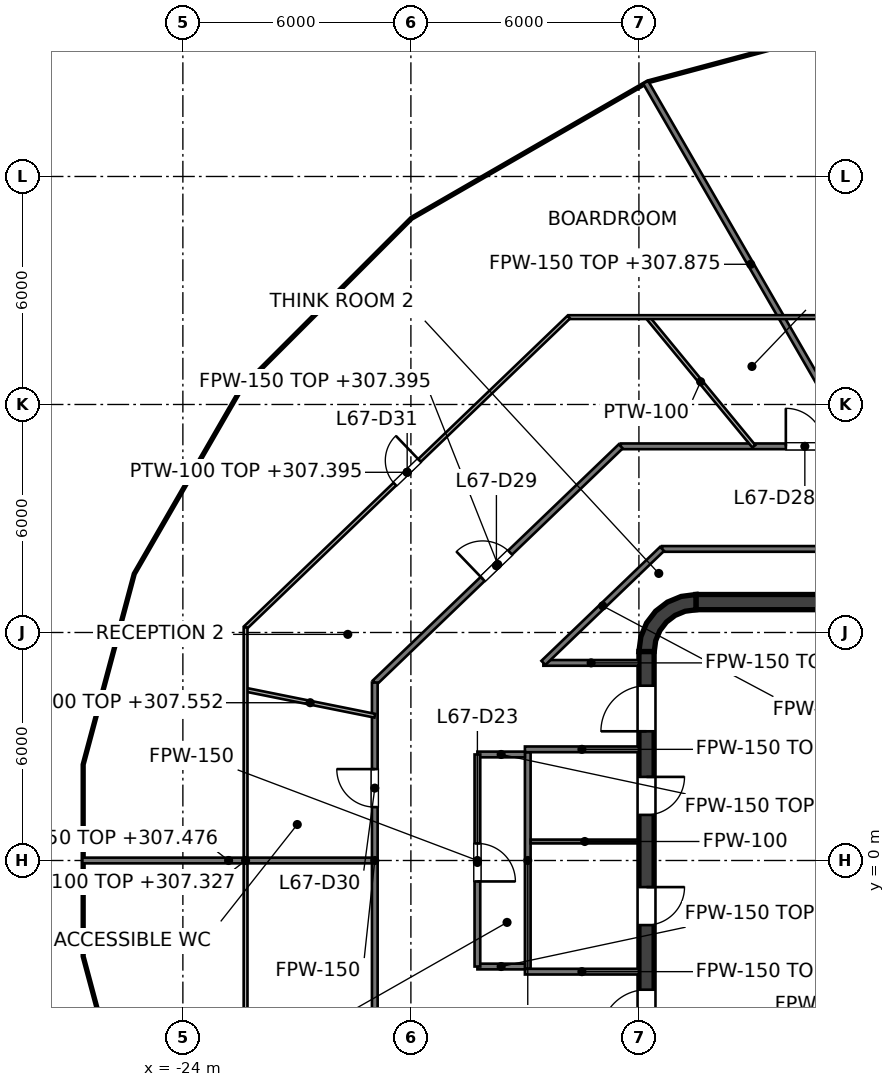
"""IFC4 building model, lengths in metres.
Left out: names, types, materials, properties, quantities, classifications, styles, units other than length and angle.
Written with IfcOpenShell. Run it as: python <this file> out.ifc"""

import sys

from ifc_helpers import new_model, si_unit, direction, frame, frame_2d, origin, place, context, subcontext, project, spatial, polyline, rectangle, outline, extrude, element, fill, save


model = new_model("IFC4")
c1 = context("Model", 3, precision=1e-05, world=origin(), true_north=direction((0.0, 1.0)))
c2 = subcontext(c1, "Body", "Model", "MODEL_VIEW")
j1 = project(units=[si_unit("LENGTHUNIT", "METRE"), si_unit("PLANEANGLEUNIT", "RADIAN")], contexts=[c1])
p1 = place(None, origin())
s1 = spatial("IfcSite", under=j1, at=p1, CompositionType="ELEMENT")
p2 = place(p1, origin())
s2 = spatial("IfcBuilding", under=s1, at=p2, CompositionType="ELEMENT")
p3 = place(p2, frame((0.0, 0.0, 304.4)))
s3 = spatial("IfcBuildingStorey", under=s2, at=p3, CompositionType="ELEMENT", Elevation=304.4)
p4 = place(p3, frame((-10.5, 6.8, 0.0), z_axis=(0.0, 0.0, 1.0), x_axis=(1.0, 0.0, 0.0)))
e1 = element("IfcWall", 1, at=p4, inside=s3, PredefinedType="SHEAR", context=c2, shape_type="SweptSolid", body=[
    extrude(rectangle(XDim=21.0, YDim=0.4, at=frame_2d((10.5, 0.0))), origin(), (0.0, 0.0, 1.0), 4.0),
])
p5 = place(p3, frame((-11.8, -5.5, 0.0), z_axis=(0.0, 0.0, 1.0), x_axis=(0.0, 1.0, 0.0)))
e2 = element("IfcWall", 2, at=p5, inside=s3, PredefinedType="SHEAR", context=c2, shape_type="SweptSolid", body=[
    extrude(rectangle(XDim=11.0, YDim=0.4, at=frame_2d((5.5, 0.0))), origin(), (0.0, 0.0, 1.0), 4.0),
])
p6 = place(p5, frame((3.8, 0.0, 0.0)))
e3 = element("IfcOpeningElement", 3, at=p6, cuts=e2, PredefinedType="OPENING", context=c2, shape_type="SweptSolid", body=[
    extrude(rectangle(XDim=1.0, YDim=2.1, at=frame_2d((0.5, 1.05))), frame((0.0, 0.2, 0.0), z_axis=(0.0, -1.0, 0.0), x_axis=(1.0, 0.0, 0.0)), (0.0, 0.0, 1.0), 0.4),
])
p7 = place(p5, frame((6.7, 0.0, 0.0)))
e4 = element("IfcOpeningElement", 4, at=p7, cuts=e2, PredefinedType="OPENING", context=c2, shape_type="SweptSolid", body=[
    extrude(rectangle(XDim=1.0, YDim=2.1, at=frame_2d((0.5, 1.05))), frame((0.0, 0.2, 0.0), z_axis=(0.0, -1.0, 0.0), x_axis=(1.0, 0.0, 0.0)), (0.0, 0.0, 1.0), 0.4),
])
p8 = place(p5, frame((0.9, 0.0, 0.0)))
e5 = element("IfcOpeningElement", 5, at=p8, cuts=e2, PredefinedType="OPENING", context=c2, shape_type="SweptSolid", body=[
    extrude(rectangle(XDim=1.2, YDim=2.1, at=frame_2d((0.6, 1.05))), frame((0.0, 0.2, 0.0), z_axis=(0.0, -1.0, 0.0), x_axis=(1.0, 0.0, 0.0)), (0.0, 0.0, 1.0), 0.4),
])
p9 = place(p5, frame((8.9, 0.0, 0.0)))
e6 = element("IfcOpeningElement", 6, at=p9, cuts=e2, PredefinedType="OPENING", context=c2, shape_type="SweptSolid", body=[
    extrude(rectangle(XDim=1.2, YDim=2.1, at=frame_2d((0.6, 1.05))), frame((0.0, 0.2, 0.0), z_axis=(0.0, -1.0, 0.0), x_axis=(1.0, 0.0, 0.0)), (0.0, 0.0, 1.0), 0.4),
])
p10 = place(p3, origin())
e7 = element("IfcWall", 7, at=p10, inside=s3, PredefinedType="SHEAR", context=c2, shape_type="SweptSolid", body=[
    extrude(outline(polyline([(-12.0, 5.5), (-11.596, 5.5), (-11.559, 5.784), (-11.45, 6.048), (-11.275, 6.275), (-11.048, 6.45), (-10.784, 6.559), (-10.5, 6.596), (-10.5, 7.0), (-10.888, 6.949), (-11.25, 6.799), (-11.561, 6.561), (-11.799, 6.25), (-11.949, 5.888), (-12.0, 5.5)])), origin(), (0.0, 0.0, 1.0), 4.0),
])
p11 = place(p3, frame((-9.0, 4.1, 0.0), z_axis=(0.0, 0.0, 1.0), x_axis=(0.0, 1.0, 0.0)))
e8 = element("IfcWall", 8, at=p11, inside=s3, PredefinedType="SOLIDWALL", context=c2, shape_type="SweptSolid", body=[
    extrude(rectangle(XDim=2.5, YDim=0.25, at=frame_2d((1.25, 0.0))), origin(), (0.0, 0.0, 1.0), 3.85),
])
p12 = place(p11, frame((0.65, 0.0, 0.0)))
e9 = element("IfcOpeningElement", 9, at=p12, cuts=e8, PredefinedType="OPENING", context=c2, shape_type="SweptSolid", body=[
    extrude(rectangle(XDim=1.2, YDim=2.1, at=frame_2d((0.6, 1.05))), frame((0.0, 0.125, 0.0), z_axis=(0.0, -1.0, 0.0), x_axis=(1.0, 0.0, 0.0)), (0.0, 0.0, 1.0), 0.25),
])
p13 = place(p3, frame((-9.125, 1.525, 0.0), z_axis=(0.0, 0.0, 1.0), x_axis=(1.0, 0.0, 0.0)))
e10 = element("IfcWall", 10, at=p13, inside=s3, PredefinedType="SOLIDWALL", context=c2, shape_type="SweptSolid", body=[
    extrude(rectangle(XDim=8.35, YDim=0.25, at=frame_2d((4.175, 0.0))), origin(), (0.0, 0.0, 1.0), 3.85),
])
p14 = place(p13, frame((0.925, 0.0, 0.0)))
e11 = element("IfcOpeningElement", 11, at=p14, cuts=e10, PredefinedType="OPENING", context=c2, shape_type="SweptSolid", body=[
    extrude(rectangle(XDim=1.1, YDim=2.1, at=frame_2d((0.55, 1.05))), frame((0.0, 0.125, 0.0), z_axis=(0.0, -1.0, 0.0), x_axis=(1.0, 0.0, 0.0)), (0.0, 0.0, 1.0), 0.25),
])
p15 = place(p13, frame((3.625, 0.0, 0.0)))
e12 = element("IfcOpeningElement", 12, at=p15, cuts=e10, PredefinedType="OPENING", context=c2, shape_type="SweptSolid", body=[
    extrude(rectangle(XDim=1.1, YDim=2.1, at=frame_2d((0.55, 1.05))), frame((0.0, 0.125, 0.0), z_axis=(0.0, -1.0, 0.0), x_axis=(1.0, 0.0, 0.0)), (0.0, 0.0, 1.0), 0.25),
])
p16 = place(p13, frame((6.325, 0.0, 0.0)))
e13 = element("IfcOpeningElement", 13, at=p16, cuts=e10, PredefinedType="OPENING", context=c2, shape_type="SweptSolid", body=[
    extrude(rectangle(XDim=1.1, YDim=2.1, at=frame_2d((0.55, 1.05))), frame((0.0, 0.125, 0.0), z_axis=(0.0, -1.0, 0.0), x_axis=(1.0, 0.0, 0.0)), (0.0, 0.0, 1.0), 0.25),
])
p17 = place(p3, frame((-9.125, 3.975, 0.0), z_axis=(0.0, 0.0, 1.0), x_axis=(1.0, 0.0, 0.0)))
e14 = element("IfcWall", 14, at=p17, inside=s3, PredefinedType="SOLIDWALL", context=c2, shape_type="SweptSolid", body=[
    extrude(rectangle(XDim=8.35, YDim=0.25, at=frame_2d((4.175, 0.0))), origin(), (0.0, 0.0, 1.0), 3.85),
])
p18 = place(p3, frame((-9.0, 1.65, 0.0), z_axis=(0.0, 0.0, 1.0), x_axis=(0.0, 1.0, 0.0)))
e15 = element("IfcWall", 15, at=p18, inside=s3, PredefinedType="SOLIDWALL", context=c2, shape_type="SweptSolid", body=[
    extrude(rectangle(XDim=2.2, YDim=0.25, at=frame_2d((1.1, 0.0))), origin(), (0.0, 0.0, 1.0), 3.85),
])
p19 = place(p3, frame((-9.125, -1.525, 0.0), z_axis=(0.0, 0.0, 1.0), x_axis=(1.0, 0.0, 0.0)))
e16 = element("IfcWall", 16, at=p19, inside=s3, PredefinedType="SOLIDWALL", context=c2, shape_type="SweptSolid", body=[
    extrude(rectangle(XDim=18.25, YDim=0.25, at=frame_2d((9.125, 0.0))), origin(), (0.0, 0.0, 1.0), 3.85),
])
p20 = place(p19, frame((7.15, 0.0, 0.0)))
e17 = element("IfcOpeningElement", 17, at=p20, cuts=e16, PredefinedType="OPENING", context=c2, shape_type="SweptSolid", body=[
    extrude(rectangle(XDim=1.2, YDim=2.1, at=frame_2d((0.6, 1.05))), frame((0.0, 0.125, 0.0), z_axis=(0.0, -1.0, 0.0), x_axis=(1.0, 0.0, 0.0)), (0.0, 0.0, 1.0), 0.25),
])
p21 = place(p19, frame((10.2, 0.0, 0.0)))
e18 = element("IfcOpeningElement", 18, at=p21, cuts=e16, PredefinedType="OPENING", context=c2, shape_type="SweptSolid", body=[
    extrude(rectangle(XDim=1.2, YDim=2.1, at=frame_2d((0.6, 1.05))), frame((0.0, 0.125, 0.0), z_axis=(0.0, -1.0, 0.0), x_axis=(1.0, 0.0, 0.0)), (0.0, 0.0, 1.0), 0.25),
])
p22 = place(p19, frame((16.075, 0.0, 0.0)))
e19 = element("IfcOpeningElement", 19, at=p22, cuts=e16, PredefinedType="OPENING", context=c2, shape_type="SweptSolid", body=[
    extrude(rectangle(XDim=1.0, YDim=2.1, at=frame_2d((0.5, 1.05))), frame((0.0, 0.125, 0.0), z_axis=(0.0, -1.0, 0.0), x_axis=(1.0, 0.0, 0.0)), (0.0, 0.0, 1.0), 0.25),
])
p23 = place(p3, frame((-9.0, -3.85, 0.0), z_axis=(0.0, 0.0, 1.0), x_axis=(0.0, 1.0, 0.0)))
e20 = element("IfcWall", 20, at=p23, inside=s3, PredefinedType="SOLIDWALL", context=c2, shape_type="SweptSolid", body=[
    extrude(rectangle(XDim=2.2, YDim=0.25, at=frame_2d((1.1, 0.0))), origin(), (0.0, 0.0, 1.0), 3.85),
])
p24 = place(p3, frame((-14.925, -2.85, 0.0), z_axis=(0.0, 0.0, 1.0), x_axis=(0.0, 1.0, 0.0)))
e21 = element("IfcWall", 21, at=p24, inside=s3, PredefinedType="PARTITIONING", context=c2, shape_type="SweptSolid", body=[
    extrude(rectangle(XDim=5.7, YDim=0.15, at=frame_2d((2.85, 0.0))), origin(), (0.0, 0.0, 1.0), 2.927),
])
for number, where, z_axis, x_axis in (
    (22, (-15.0, 2.925, 0.0), (0.0, 0.0, 1.0), (1.0, 0.0, 0.0)),
    (23, (-15.0, -2.925, 0.0), (0.0, 0.0, 1.0), (1.0, 0.0, 0.0)),
):
    element("IfcWall", number, at=place(p3, frame(where, z_axis=z_axis, x_axis=x_axis)), inside=s3, PredefinedType="PARTITIONING", context=c2, shape_type="SweptSolid", body=[
        extrude(rectangle(XDim=3.0, YDim=0.15, at=frame_2d((1.5, 0.0))), origin(), (0.0, 0.0, 1.0), 3.152),
    ])
p25 = place(p3, frame((-14.85, 0.5, 0.0), z_axis=(0.0, 0.0, 1.0), x_axis=(1.0, 0.0, 0.0)))
e24 = element("IfcWall", 24, at=p25, inside=s3, PredefinedType="PARTITIONING", context=c2, shape_type="SweptSolid", body=[
    extrude(rectangle(XDim=2.85, YDim=0.1, at=frame_2d((1.425, 0.0))), origin(), (0.0, 0.0, 1.0), 3.85),
])
p26 = place(p3, frame((-11.824, 20.48, 0.0), z_axis=(0.0, 0.0, 1.0), x_axis=(0.500024263458, -0.866011394817, 0.0)))
e25 = element("IfcWall", 25, at=p26, inside=s3, PredefinedType="PARTITIONING", context=c2, shape_type="SweptSolid", body=[
    extrude(rectangle(XDim=11.063, YDim=0.15, at=frame_2d((5.532, 0.0))), origin(), (0.0, 0.0, 1.0), 3.475),
])
p27 = place(p3, frame((-16.25, -2.79, 0.0), z_axis=(0.0, 0.0, 1.0), x_axis=(1.0, 0.0, 0.0)))
e26 = element("IfcWall", 26, at=p27, inside=s3, PredefinedType="PARTITIONING", context=c2, shape_type="SweptSolid", body=[
    extrude(rectangle(XDim=1.25, YDim=0.15, at=frame_2d((0.625, 0.0))), origin(), (0.0, 0.0, 1.0), 3.85),
])
p28 = place(p3, frame((-26.644, 0.0, 0.0), z_axis=(0.0, 0.0, 1.0), x_axis=(1.0, 0.0, 0.0)))
e27 = element("IfcWall", 27, at=p28, inside=s3, PredefinedType="PARTITIONING", context=c2, shape_type="SweptSolid", body=[
    extrude(rectangle(XDim=7.694, YDim=0.15, at=frame_2d((3.847, 0.0))), origin(), (0.0, 0.0, 1.0), 3.076),
])
p29 = place(p3, frame((-16.25, 2.79, 0.0), z_axis=(0.0, 0.0, 1.0), x_axis=(1.0, 0.0, 0.0)))
e28 = element("IfcWall", 28, at=p29, inside=s3, PredefinedType="PARTITIONING", context=c2, shape_type="SweptSolid", body=[
    extrude(rectangle(XDim=1.25, YDim=0.15, at=frame_2d((0.625, 0.0))), origin(), (0.0, 0.0, 1.0), 3.85),
])
p30 = place(p3, frame((-14.514, 5.2, 0.0), z_axis=(0.0, 0.0, 1.0), x_axis=(1.0, 0.0, 0.0)))
e29 = element("IfcWall", 29, at=p30, inside=s3, PredefinedType="PARTITIONING", context=c2, shape_type="SweptSolid", body=[
    extrude(rectangle(XDim=2.514, YDim=0.15, at=frame_2d((1.257, 0.0))), origin(), (0.0, 0.0, 1.0), 3.152),
])
p31 = place(p3, frame((-11.391, 8.199, 0.0), z_axis=(0.0, 0.0, 1.0), x_axis=(1.0, 0.0, 0.0)))
e30 = element("IfcWall", 30, at=p31, inside=s3, PredefinedType="PARTITIONING", context=c2, shape_type="SweptSolid", body=[
    extrude(rectangle(XDim=22.782, YDim=0.15, at=frame_2d((11.391, 0.0))), origin(), (0.0, 0.0, 1.0), 2.927),
])
p32 = place(p31, frame((16.536, 0.0, 0.0)))
e31 = element("IfcOpeningElement", 31, at=p32, cuts=e30, PredefinedType="OPENING", context=c2, shape_type="SweptSolid", body=[
    extrude(rectangle(XDim=1.0, YDim=2.1, at=frame_2d((0.5, 1.05))), frame((0.0, 0.075, 0.0), z_axis=(0.0, -1.0, 0.0), x_axis=(1.0, 0.0, 0.0)), (0.0, 0.0, 1.0), 0.15),
])
p33 = place(p31, frame((5.145, 0.0, 0.0)))
e32 = element("IfcOpeningElement", 32, at=p33, cuts=e30, PredefinedType="OPENING", context=c2, shape_type="SweptSolid", body=[
    extrude(rectangle(XDim=1.0, YDim=2.1, at=frame_2d((0.5, 1.05))), frame((0.0, 0.075, 0.0), z_axis=(0.0, -1.0, 0.0), x_axis=(1.0, 0.0, 0.0)), (0.0, 0.0, 1.0), 0.15),
])
p34 = place(p3, frame((-12.478, 10.899, 0.0), z_axis=(0.0, 0.0, 1.0), x_axis=(1.0, 0.0, 0.0)))
e33 = element("IfcWall", 33, at=p34, inside=s3, PredefinedType="PARTITIONING", context=c2, shape_type="SweptSolid", body=[
    extrude(rectangle(XDim=24.956, YDim=0.15, at=frame_2d((12.478, 0.0))), origin(), (0.0, 0.0, 1.0), 2.927),
])
p35 = place(p34, frame((19.856, 0.0, 0.0)))
e34 = element("IfcOpeningElement", 34, at=p35, cuts=e33, PredefinedType="OPENING", context=c2, shape_type="SweptSolid", body=[
    extrude(rectangle(XDim=1.0, YDim=2.1, at=frame_2d((0.5, 1.05))), frame((0.0, 0.075, 0.0), z_axis=(0.0, -1.0, 0.0), x_axis=(1.0, 0.0, 0.0)), (0.0, 0.0, 1.0), 0.15),
])
p36 = place(p34, frame((14.508, 0.0, 0.0)))
e35 = element("IfcOpeningElement", 35, at=p36, cuts=e33, PredefinedType="OPENING", context=c2, shape_type="SweptSolid", body=[
    extrude(rectangle(XDim=1.0, YDim=2.1, at=frame_2d((0.5, 1.05))), frame((0.0, 0.075, 0.0), z_axis=(0.0, -1.0, 0.0), x_axis=(1.0, 0.0, 0.0)), (0.0, 0.0, 1.0), 0.15),
])
p37 = place(p34, frame((9.086, 0.0, 0.0)))
e36 = element("IfcOpeningElement", 36, at=p37, cuts=e33, PredefinedType="OPENING", context=c2, shape_type="SweptSolid", body=[
    extrude(rectangle(XDim=1.0, YDim=2.1, at=frame_2d((0.5, 1.05))), frame((0.0, 0.075, 0.0), z_axis=(0.0, -1.0, 0.0), x_axis=(1.0, 0.0, 0.0)), (0.0, 0.0, 1.0), 0.15),
])
p38 = place(p34, frame((4.344, 0.0, 0.0)))
e37 = element("IfcOpeningElement", 37, at=p38, cuts=e33, PredefinedType="OPENING", context=c2, shape_type="SweptSolid", body=[
    extrude(rectangle(XDim=1.0, YDim=2.1, at=frame_2d((0.5, 1.05))), frame((0.0, 0.075, 0.0), z_axis=(0.0, -1.0, 0.0), x_axis=(1.0, 0.0, 0.0)), (0.0, 0.0, 1.0), 0.15),
])
p39 = place(p3, frame((-14.514, 5.2, 0.0), z_axis=(0.0, 0.0, 1.0), x_axis=(0.721228427004, 0.692697304803, 0.0)))
e38 = element("IfcWall", 38, at=p39, inside=s3, PredefinedType="PARTITIONING", context=c2, shape_type="SweptSolid", body=[
    extrude(rectangle(XDim=4.33, YDim=0.15, at=frame_2d((2.165, 0.0))), origin(), (0.0, 0.0, 1.0), 3.076),
])
p40 = place(p3, frame((-18.95, 4.683, 0.0), z_axis=(0.0, 0.0, 1.0), x_axis=(0.721259541977, 0.692664906797, 0.0)))
e39 = element("IfcWall", 39, at=p40, inside=s3, PredefinedType="PARTITIONING", context=c2, shape_type="SweptSolid", body=[
    extrude(rectangle(XDim=8.973, YDim=0.15, at=frame_2d((4.487, 0.0))), origin(), (0.0, 0.0, 1.0), 2.995),
])
p41 = place(p40, frame((3.937, 0.0, 0.0)))
e40 = element("IfcOpeningElement", 40, at=p41, cuts=e39, PredefinedType="OPENING", context=c2, shape_type="SweptSolid", body=[
    extrude(rectangle(XDim=1.0, YDim=2.1, at=frame_2d((0.5, 1.05))), frame((0.0, 0.075, 0.0), z_axis=(0.0, -1.0, 0.0), x_axis=(1.0, 0.0, 0.0)), (0.0, 0.0, 1.0), 0.15),
])
p42 = place(p3, frame((-16.25, -2.79, 0.0), z_axis=(0.0, 0.0, 1.0), x_axis=(0.0, 1.0, 0.0)))
e41 = element("IfcWall", 41, at=p42, inside=s3, PredefinedType="PARTITIONING", context=c2, shape_type="SweptSolid", body=[
    extrude(rectangle(XDim=5.58, YDim=0.15, at=frame_2d((2.79, 0.0))), origin(), (0.0, 0.0, 1.0), 2.927),
])
p43 = place(p42, frame((2.239, 0.0, 0.0)))
e42 = element("IfcOpeningElement", 42, at=p43, cuts=e41, PredefinedType="OPENING", context=c2, shape_type="SweptSolid", body=[
    extrude(rectangle(XDim=1.0, YDim=2.1, at=frame_2d((0.5, 1.05))), frame((0.0, 0.075, 0.0), z_axis=(0.0, -1.0, 0.0), x_axis=(1.0, 0.0, 0.0)), (0.0, 0.0, 1.0), 0.15),
])
p44 = place(p3, frame((-18.95, -4.683, 0.0), z_axis=(0.0, 0.0, 1.0), x_axis=(0.0, 1.0, 0.0)))
e43 = element("IfcWall", 43, at=p44, inside=s3, PredefinedType="PARTITIONING", context=c2, shape_type="SweptSolid", body=[
    extrude(rectangle(XDim=9.366, YDim=0.15, at=frame_2d((4.683, 0.0))), origin(), (0.0, 0.0, 1.0), 2.927),
])
p45 = place(p44, frame((6.088, 0.0, 0.0)))
e44 = element("IfcOpeningElement", 44, at=p45, cuts=e43, PredefinedType="OPENING", context=c2, shape_type="SweptSolid", body=[
    extrude(rectangle(XDim=1.0, YDim=2.1, at=frame_2d((0.5, 1.05))), frame((0.0, 0.075, 0.0), z_axis=(0.0, -1.0, 0.0), x_axis=(1.0, 0.0, 0.0)), (0.0, 0.0, 1.0), 0.15),
])
p46 = place(p3, frame((-11.776, 14.299, 0.0), z_axis=(0.0, 0.0, 1.0), x_axis=(0.63566450838, -0.771965434968, 0.0)))
e45 = element("IfcWall", 45, at=p46, inside=s3, PredefinedType="PARTITIONING", context=c2, shape_type="SweptSolid", body=[
    extrude(rectangle(XDim=4.405, YDim=0.1, at=frame_2d((2.202, 0.0))), origin(), (0.0, 0.0, 1.0), 3.85),
])
p47 = place(p3, frame((-22.35, 4.494, 0.0), z_axis=(0.0, 0.0, 1.0), x_axis=(0.980368926978, -0.197171922486, 0.0)))
e46 = element("IfcWall", 46, at=p47, inside=s3, PredefinedType="PARTITIONING", context=c2, shape_type="SweptSolid", body=[
    extrude(rectangle(XDim=3.468, YDim=0.1, at=frame_2d((1.734, 0.0))), origin(), (0.0, 0.0, 1.0), 3.152),
])
p48 = place(p3, frame((-13.846, 14.299, 0.0), z_axis=(0.0, 0.0, 1.0), x_axis=(1.0, 0.0, 0.0)))
e47 = element("IfcWall", 47, at=p48, inside=s3, PredefinedType="PARTITIONING", context=c2, shape_type="SweptSolid", body=[
    extrude(rectangle(XDim=27.692, YDim=0.1, at=frame_2d((13.846, 0.0))), origin(), (0.0, 0.0, 1.0), 2.927),
])
p49 = place(p48, frame((9.035, 0.0, 0.0)))
e48 = element("IfcOpeningElement", 48, at=p49, cuts=e47, PredefinedType="OPENING", context=c2, shape_type="SweptSolid", body=[
    extrude(rectangle(XDim=1.8, YDim=2.1, at=frame_2d((0.9, 1.05))), frame((0.0, 0.05, 0.0), z_axis=(0.0, -1.0, 0.0), x_axis=(1.0, 0.0, 0.0)), (0.0, 0.0, 1.0), 0.1),
])
p50 = place(p3, frame((-22.35, 6.132, 0.0), z_axis=(0.0, 0.0, 1.0), x_axis=(0.721259864686, 0.692664570765, 0.0)))
e49 = element("IfcWall", 49, at=p50, inside=s3, PredefinedType="PARTITIONING", context=c2, shape_type="SweptSolid", body=[
    extrude(rectangle(XDim=11.791, YDim=0.1, at=frame_2d((5.896, 0.0))), origin(), (0.0, 0.0, 1.0), 2.995),
])
p51 = place(p50, frame((5.445, 0.0, 0.0)))
e50 = element("IfcOpeningElement", 50, at=p51, cuts=e49, PredefinedType="OPENING", context=c2, shape_type="SweptSolid", body=[
    extrude(rectangle(XDim=0.9, YDim=2.1, at=frame_2d((0.45, 1.05))), frame((0.0, 0.05, 0.0), z_axis=(0.0, -1.0, 0.0), x_axis=(1.0, 0.0, 0.0)), (0.0, 0.0, 1.0), 0.1),
])
p52 = place(p3, frame((-22.35, -6.132, 0.0), z_axis=(0.0, 0.0, 1.0), x_axis=(0.0, 1.0, 0.0)))
e51 = element("IfcWall", 51, at=p52, inside=s3, PredefinedType="PARTITIONING", context=c2, shape_type="SweptSolid", body=[
    extrude(rectangle(XDim=12.264, YDim=0.1, at=frame_2d((6.132, 0.0))), origin(), (0.0, 0.0, 1.0), 2.927),
])
p53 = place(p14, origin())
e52 = element("IfcDoor", 52, at=p53, inside=s3, OperationType="DOUBLE_DOOR_SLIDING", PredefinedType="DOOR", context=c2, shape_type="SweptSolid", body=[
    extrude(rectangle(XDim=1.1, YDim=2.1, at=frame_2d((0.55, 1.05))), frame((0.0, 0.025, 0.0), z_axis=(0.0, -1.0, 0.0), x_axis=(1.0, 0.0, 0.0)), (0.0, 0.0, 1.0), 0.05),
])
fill(e11, e52)
p54 = place(p12, origin())
e53 = element("IfcDoor", 53, at=p54, inside=s3, OperationType="SINGLE_SWING_RIGHT", PredefinedType="DOOR", context=c2, shape_type="SweptSolid", body=[
    extrude(rectangle(XDim=1.2, YDim=2.1, at=frame_2d((0.6, 1.05))), frame((0.0, 0.025, 0.0), z_axis=(0.0, -1.0, 0.0), x_axis=(1.0, 0.0, 0.0)), (0.0, 0.0, 1.0), 0.05),
])
fill(e9, e53)
p55 = place(p6, origin())
e54 = element("IfcDoor", 54, at=p55, inside=s3, OperationType="SINGLE_SWING_RIGHT", PredefinedType="DOOR", context=c2, shape_type="SweptSolid", body=[
    extrude(rectangle(XDim=1.0, YDim=2.1, at=frame_2d((0.5, 1.05))), frame((0.0, 0.025, 0.0), z_axis=(0.0, -1.0, 0.0), x_axis=(1.0, 0.0, 0.0)), (0.0, 0.0, 1.0), 0.05),
])
fill(e3, e54)
p56 = place(p7, origin())
e55 = element("IfcDoor", 55, at=p56, inside=s3, OperationType="SINGLE_SWING_RIGHT", PredefinedType="DOOR", context=c2, shape_type="SweptSolid", body=[
    extrude(rectangle(XDim=1.0, YDim=2.1, at=frame_2d((0.5, 1.05))), frame((0.0, 0.025, 0.0), z_axis=(0.0, -1.0, 0.0), x_axis=(1.0, 0.0, 0.0)), (0.0, 0.0, 1.0), 0.05),
])
fill(e4, e55)
p57 = place(p8, origin())
e56 = element("IfcDoor", 56, at=p57, inside=s3, OperationType="SINGLE_SWING_LEFT", PredefinedType="DOOR", context=c2, shape_type="SweptSolid", body=[
    extrude(rectangle(XDim=1.2, YDim=2.1, at=frame_2d((0.6, 1.05))), frame((0.0, 0.025, 0.0), z_axis=(0.0, -1.0, 0.0), x_axis=(1.0, 0.0, 0.0)), (0.0, 0.0, 1.0), 0.05),
])
fill(e5, e56)
p58 = place(p9, origin())
e57 = element("IfcDoor", 57, at=p58, inside=s3, OperationType="SINGLE_SWING_LEFT", PredefinedType="DOOR", context=c2, shape_type="SweptSolid", body=[
    extrude(rectangle(XDim=1.2, YDim=2.1, at=frame_2d((0.6, 1.05))), frame((0.0, 0.025, 0.0), z_axis=(0.0, -1.0, 0.0), x_axis=(1.0, 0.0, 0.0)), (0.0, 0.0, 1.0), 0.05),
])
fill(e6, e57)
p59 = place(p43, origin())
e58 = element("IfcDoor", 58, at=p59, inside=s3, OperationType="SINGLE_SWING_LEFT", PredefinedType="DOOR", context=c2, shape_type="SweptSolid", body=[
    extrude(rectangle(XDim=1.0, YDim=2.1, at=frame_2d((0.5, 1.05))), frame((0.0, 0.025, 0.0), z_axis=(0.0, -1.0, 0.0), x_axis=(1.0, 0.0, 0.0)), (0.0, 0.0, 1.0), 0.05),
])
fill(e42, e58)
p60 = place(p38, origin())
e59 = element("IfcDoor", 59, at=p60, inside=s3, OperationType="SINGLE_SWING_LEFT", PredefinedType="DOOR", context=c2, shape_type="SweptSolid", body=[
    extrude(rectangle(XDim=1.0, YDim=2.1, at=frame_2d((0.5, 1.05))), frame((0.0, 0.025, 0.0), z_axis=(0.0, -1.0, 0.0), x_axis=(1.0, 0.0, 0.0)), (0.0, 0.0, 1.0), 0.05),
])
fill(e37, e59)
p61 = place(p41, origin())
e60 = element("IfcDoor", 60, at=p61, inside=s3, OperationType="SINGLE_SWING_LEFT", PredefinedType="DOOR", context=c2, shape_type="SweptSolid", body=[
    extrude(rectangle(XDim=1.0, YDim=2.1, at=frame_2d((0.5, 1.05))), frame((0.0, 0.025, 0.0), z_axis=(0.0, -1.0, 0.0), x_axis=(1.0, 0.0, 0.0)), (0.0, 0.0, 1.0), 0.05),
])
fill(e40, e60)
p62 = place(p45, origin())
e61 = element("IfcDoor", 61, at=p62, inside=s3, OperationType="SINGLE_SWING_RIGHT", PredefinedType="DOOR", context=c2, shape_type="SweptSolid", body=[
    extrude(rectangle(XDim=1.0, YDim=2.1, at=frame_2d((0.5, 1.05))), frame((0.0, 0.025, 0.0), z_axis=(0.0, -1.0, 0.0), x_axis=(1.0, 0.0, 0.0)), (0.0, 0.0, 1.0), 0.05),
])
fill(e44, e61)
p63 = place(p51, origin())
e62 = element("IfcDoor", 62, at=p63, inside=s3, OperationType="SINGLE_SWING_RIGHT", PredefinedType="DOOR", context=c2, shape_type="SweptSolid", body=[
    extrude(rectangle(XDim=0.9, YDim=2.1, at=frame_2d((0.45, 1.05))), frame((0.0, 0.025, 0.0), z_axis=(0.0, -1.0, 0.0), x_axis=(1.0, 0.0, 0.0)), (0.0, 0.0, 1.0), 0.05),
])
fill(e50, e62)
save(model, sys.argv[1])
